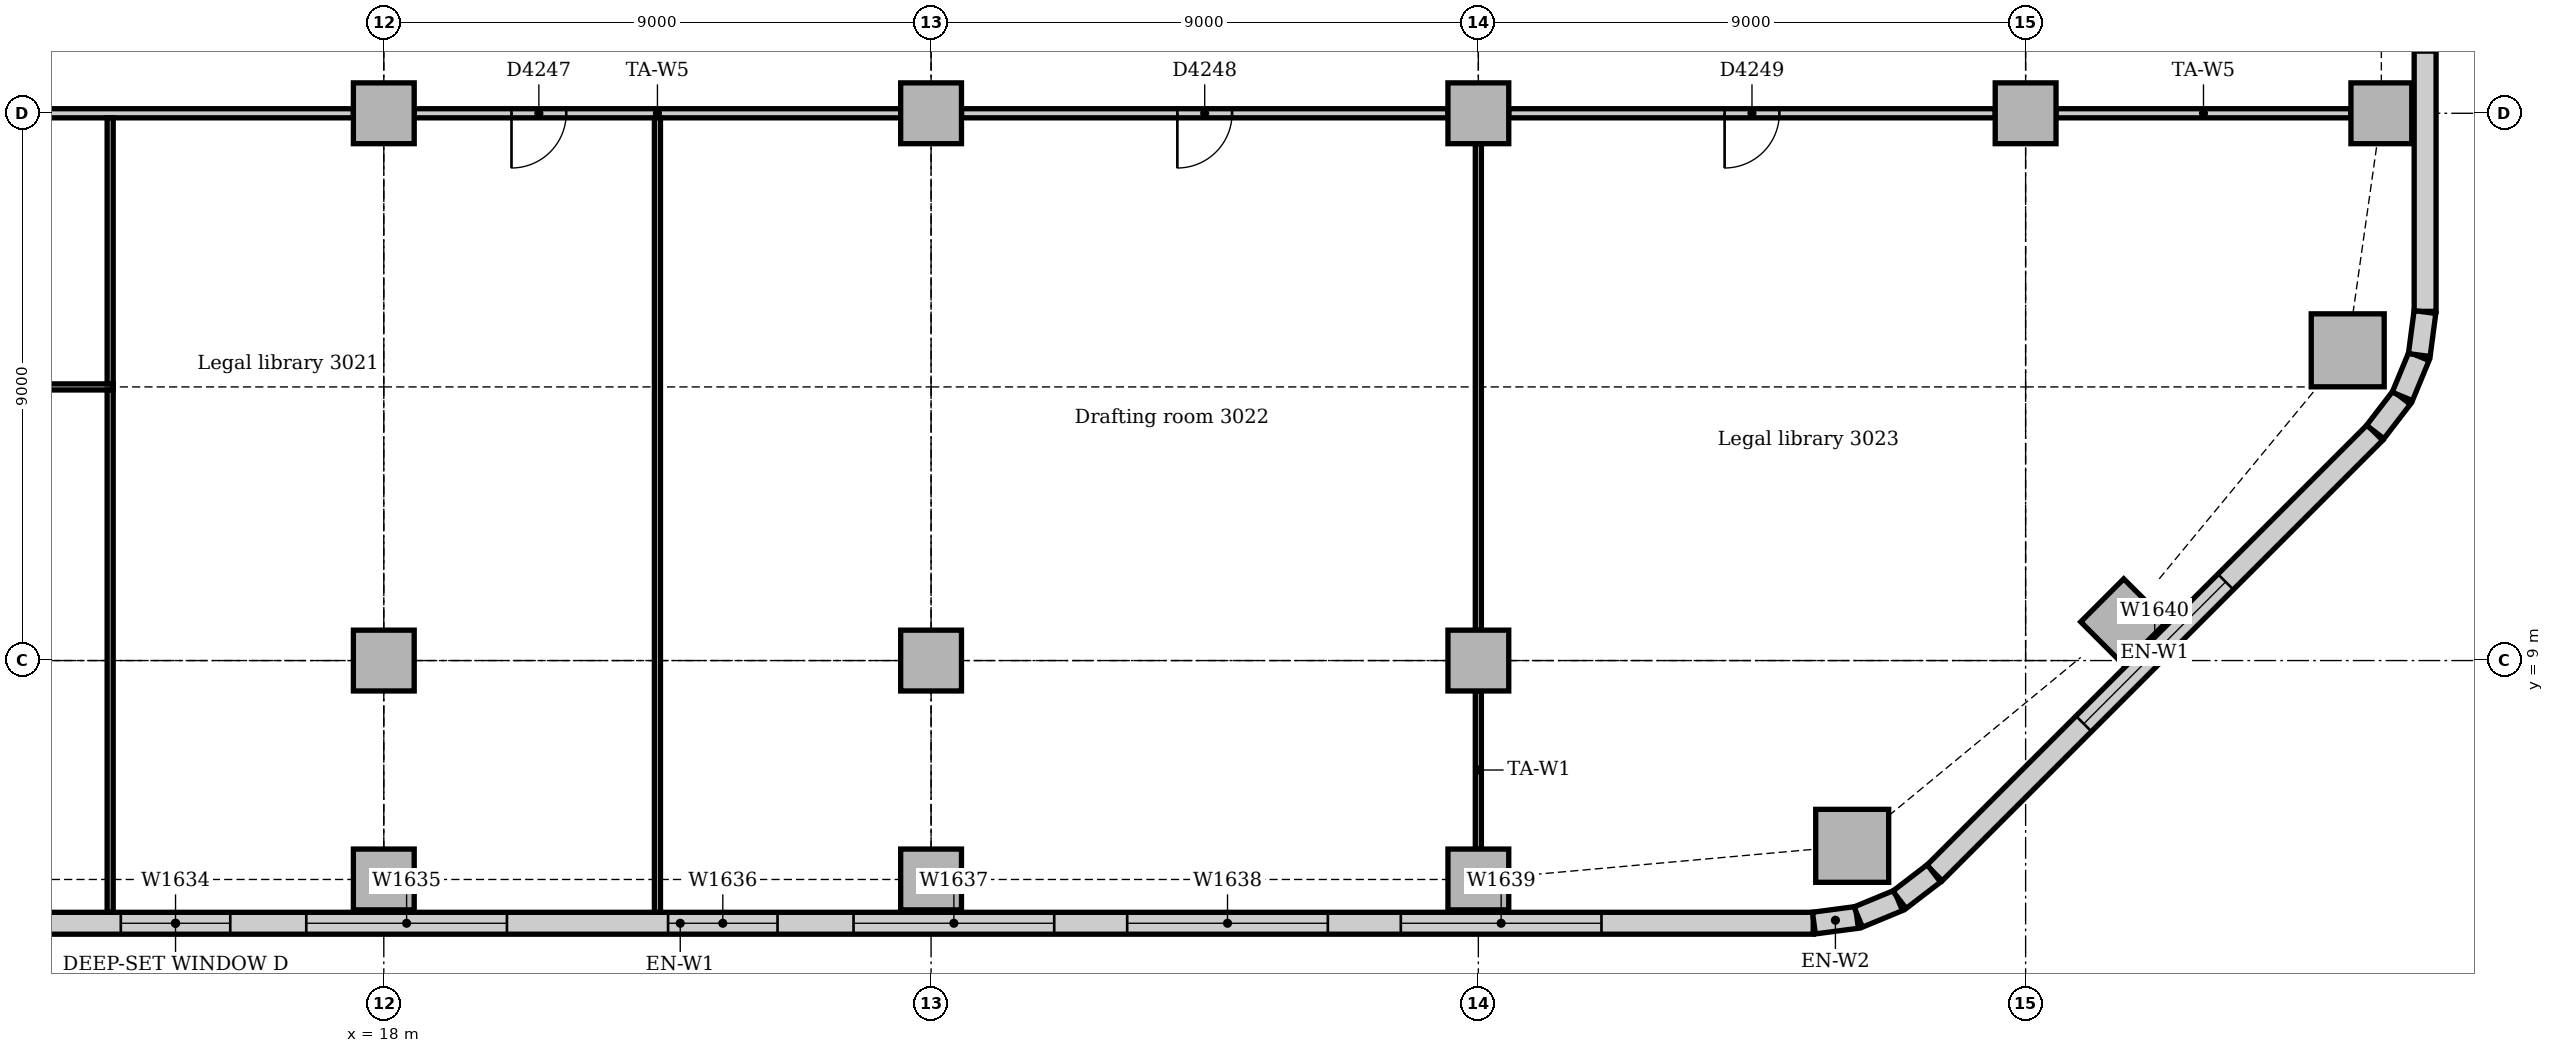
"""IFC4 building model, lengths in metres.
Left out: names, types, materials, properties, quantities, classifications, styles, units other than length and angle.
Written with IfcOpenShell. Run it as: python <this file> out.ifc"""

import sys

from ifc_helpers import new_model, si_unit, direction, frame, frame_2d, origin, origin_2d, place, context, subcontext, project, spatial, rectangle, extrude, element, fill, save


model = new_model("IFC4")
c1 = context("Model", 3, precision=1e-05, world=origin(), true_north=direction((0.0, 1.0)))
c2 = subcontext(c1, "Body", "Model", "MODEL_VIEW")
j1 = project(units=[si_unit("LENGTHUNIT", "METRE"), si_unit("PLANEANGLEUNIT", "RADIAN")], contexts=[c1])
p1 = place(None, origin())
s1 = spatial("IfcSite", under=j1, at=p1, CompositionType="ELEMENT")
p2 = place(p1, origin())
s2 = spatial("IfcBuilding", under=s1, at=p2, CompositionType="ELEMENT")
p3 = place(p2, frame((0.0, 0.0, 128.0)))
s3 = spatial("IfcBuildingStorey", under=s2, at=p3, CompositionType="ELEMENT", Elevation=128.0)
for number, where, z_axis, x_axis in (
    (1, (42.148, 5.953, 0.0), (0.0, 0.0, 1.0), (1.0, 0.0, 0.0)),
    (2, (50.297, 14.102, 0.0), (0.0, 0.0, 1.0), (1.0, 0.0, 0.0)),
):
    element("IfcColumn", number, at=place(p3, frame(where, z_axis=z_axis, x_axis=x_axis)), inside=s3, PredefinedType="COLUMN", context=c2, shape_type="SweptSolid", body=[
        extrude(rectangle(XDim=1.2, YDim=1.2, at=origin_2d()), origin(), (0.0, 0.0, 1.0), 3.85),
    ])
for number, where, z_axis, x_axis in (
    (3, (18.0, 5.4, 0.0), (0.0, 0.0, 1.0), (1.0, 0.0, 0.0)),
    (4, (27.0, 5.4, 0.0), (0.0, 0.0, 1.0), (1.0, 0.0, 0.0)),
    (5, (36.0, 5.4, 0.0), (0.0, 0.0, 1.0), (1.0, 0.0, 0.0)),
    (6, (46.614, 9.636, 0.0), (0.0, 0.0, 1.0), (0.707, 0.707, 0.0)),
    (7, (50.85, 18.0, 0.0), (0.0, 0.0, 1.0), (1.0, 0.0, 0.0)),
    (8, (18.0, 9.0, 0.0), (0.0, 0.0, 1.0), (1.0, 0.0, 0.0)),
    (9, (18.0, 18.0, 0.0), (0.0, 0.0, 1.0), (1.0, 0.0, 0.0)),
    (10, (27.0, 9.0, 0.0), (0.0, 0.0, 1.0), (1.0, 0.0, 0.0)),
    (11, (27.0, 18.0, 0.0), (0.0, 0.0, 1.0), (1.0, 0.0, 0.0)),
    (12, (36.0, 9.0, 0.0), (0.0, 0.0, 1.0), (1.0, 0.0, 0.0)),
    (13, (36.0, 18.0, 0.0), (0.0, 0.0, 1.0), (1.0, 0.0, 0.0)),
    (14, (45.0, 18.0, 0.0), (0.0, 0.0, 1.0), (1.0, 0.0, 0.0)),
):
    element("IfcColumn", number, at=place(p3, frame(where, z_axis=z_axis, x_axis=x_axis)), inside=s3, PredefinedType="COLUMN", context=c2, shape_type="SweptSolid", body=[
        extrude(rectangle(XDim=1.0, YDim=1.0, at=origin_2d()), origin(), (0.0, 0.0, 1.0), 3.85),
    ])
p4 = place(p3, frame((4.243, 4.68, 0.0), z_axis=(0.0, 0.0, 1.0), x_axis=(1.0, 0.0, 0.0)))
e15 = element("IfcWall", 15, at=p4, inside=s3, PredefinedType="STANDARD", context=c2, shape_type="SweptSolid", body=[
    extrude(rectangle(XDim=37.265, YDim=0.36, at=frame_2d((18.632, 0.0))), origin(), (0.0, 0.0, 1.0), 3.85),
])
p5 = place(p4, frame((3.482, 0.0, 0.9)))
e16 = element("IfcOpeningElement", 16, at=p5, cuts=e15, PredefinedType="OPENING", context=c2, shape_type="SweptSolid", body=[
    extrude(rectangle(XDim=3.3, YDim=1.6, at=frame_2d((1.65, 0.8))), frame((0.0, 0.19, 0.0), z_axis=(0.0, -1.0, 0.0), x_axis=(1.0, 0.0, 0.0)), (0.0, 0.0, 1.0), 0.38),
])
p6 = place(p4, frame((9.432, 0.0, 0.9)))
e17 = element("IfcOpeningElement", 17, at=p6, cuts=e15, PredefinedType="OPENING", context=c2, shape_type="SweptSolid", body=[
    extrude(rectangle(XDim=1.8, YDim=1.6, at=frame_2d((0.9, 0.8))), frame((0.0, 0.19, 0.0), z_axis=(0.0, -1.0, 0.0), x_axis=(1.0, 0.0, 0.0)), (0.0, 0.0, 1.0), 0.38),
])
p7 = place(p4, frame((12.482, 0.0, 0.9)))
e18 = element("IfcOpeningElement", 18, at=p7, cuts=e15, PredefinedType="OPENING", context=c2, shape_type="SweptSolid", body=[
    extrude(rectangle(XDim=3.3, YDim=1.6, at=frame_2d((1.65, 0.8))), frame((0.0, 0.19, 0.0), z_axis=(0.0, -1.0, 0.0), x_axis=(1.0, 0.0, 0.0)), (0.0, 0.0, 1.0), 0.38),
])
p8 = place(p4, frame((18.432, 0.0, 0.9)))
e19 = element("IfcOpeningElement", 19, at=p8, cuts=e15, PredefinedType="OPENING", context=c2, shape_type="SweptSolid", body=[
    extrude(rectangle(XDim=1.8, YDim=1.6, at=frame_2d((0.9, 0.8))), frame((0.0, 0.19, 0.0), z_axis=(0.0, -1.0, 0.0), x_axis=(1.0, 0.0, 0.0)), (0.0, 0.0, 1.0), 0.38),
])
p9 = place(p4, frame((21.482, 0.0, 0.9)))
e20 = element("IfcOpeningElement", 20, at=p9, cuts=e15, PredefinedType="OPENING", context=c2, shape_type="SweptSolid", body=[
    extrude(rectangle(XDim=3.3, YDim=1.6, at=frame_2d((1.65, 0.8))), frame((0.0, 0.19, 0.0), z_axis=(0.0, -1.0, 0.0), x_axis=(1.0, 0.0, 0.0)), (0.0, 0.0, 1.0), 0.38),
])
p10 = place(p4, frame((25.982, 0.0, 0.9)))
e21 = element("IfcOpeningElement", 21, at=p10, cuts=e15, PredefinedType="OPENING", context=c2, shape_type="SweptSolid", body=[
    extrude(rectangle(XDim=3.3, YDim=1.6, at=frame_2d((1.65, 0.8))), frame((0.0, 0.19, 0.0), z_axis=(0.0, -1.0, 0.0), x_axis=(1.0, 0.0, 0.0)), (0.0, 0.0, 1.0), 0.38),
])
p11 = place(p4, frame((30.482, 0.0, 0.9)))
e22 = element("IfcOpeningElement", 22, at=p11, cuts=e15, PredefinedType="OPENING", context=c2, shape_type="SweptSolid", body=[
    extrude(rectangle(XDim=3.3, YDim=1.6, at=frame_2d((1.65, 0.8))), frame((0.0, 0.19, 0.0), z_axis=(0.0, -1.0, 0.0), x_axis=(1.0, 0.0, 0.0)), (0.0, 0.0, 1.0), 0.38),
])
p12 = place(p3, frame((43.501, 5.506, 0.0), z_axis=(0.0, 0.0, 1.0), x_axis=(0.707106781187, 0.707106781187, 0.0)))
e23 = element("IfcWall", 23, at=p12, inside=s3, PredefinedType="STANDARD", context=c2, shape_type="SweptSolid", body=[
    extrude(rectangle(XDim=10.243, YDim=0.36, at=frame_2d((5.121, 0.0))), origin(), (0.0, 0.0, 1.0), 3.85),
])
p13 = place(p12, frame((3.471, 0.0, 0.9)))
e24 = element("IfcOpeningElement", 24, at=p13, cuts=e23, PredefinedType="OPENING", context=c2, shape_type="SweptSolid", body=[
    extrude(rectangle(XDim=3.3, YDim=1.6, at=frame_2d((1.65, 0.8))), frame((0.0, 0.19, 0.0), z_axis=(0.0, -1.0, 0.0), x_axis=(1.0, 0.0, 0.0)), (0.0, 0.0, 1.0), 0.38),
])
p14 = place(p3, frame((51.57, 14.743, 0.0), z_axis=(0.0, 0.0, 1.0), x_axis=(0.0, 1.0, 0.0)))
e25 = element("IfcWall", 25, at=p14, inside=s3, PredefinedType="STANDARD", context=c2, shape_type="SweptSolid", body=[
    extrude(rectangle(XDim=24.515, YDim=0.36, at=frame_2d((12.257, 0.0))), origin(), (0.0, 0.0, 1.0), 3.85),
])
p15 = place(p14, frame((4.257, 0.0, 0.9)))
e26 = element("IfcOpeningElement", 26, at=p15, cuts=e25, PredefinedType="OPENING", context=c2, shape_type="SweptSolid", body=[
    extrude(rectangle(XDim=1.8, YDim=1.6, at=frame_2d((0.9, 0.8))), frame((0.0, 0.19, 0.0), z_axis=(0.0, -1.0, 0.0), x_axis=(1.0, 0.0, 0.0)), (0.0, 0.0, 1.0), 0.38),
])
p16 = place(p14, frame((8.357, 0.0, 0.9)))
e27 = element("IfcOpeningElement", 27, at=p16, cuts=e25, PredefinedType="OPENING", context=c2, shape_type="SweptSolid", body=[
    extrude(rectangle(XDim=3.3, YDim=1.6, at=frame_2d((1.65, 0.8))), frame((0.0, 0.19, 0.0), z_axis=(0.0, -1.0, 0.0), x_axis=(1.0, 0.0, 0.0)), (0.0, 0.0, 1.0), 0.38),
])
p17 = place(p14, frame((12.857, 0.0, 0.9)))
e28 = element("IfcOpeningElement", 28, at=p17, cuts=e25, PredefinedType="OPENING", context=c2, shape_type="SweptSolid", body=[
    extrude(rectangle(XDim=3.3, YDim=1.6, at=frame_2d((1.65, 0.8))), frame((0.0, 0.19, 0.0), z_axis=(0.0, -1.0, 0.0), x_axis=(1.0, 0.0, 0.0)), (0.0, 0.0, 1.0), 0.38),
])
p18 = place(p14, frame((17.357, 0.0, 0.9)))
e29 = element("IfcOpeningElement", 29, at=p18, cuts=e25, PredefinedType="OPENING", context=c2, shape_type="SweptSolid", body=[
    extrude(rectangle(XDim=3.3, YDim=1.6, at=frame_2d((1.65, 0.8))), frame((0.0, 0.19, 0.0), z_axis=(0.0, -1.0, 0.0), x_axis=(1.0, 0.0, 0.0)), (0.0, 0.0, 1.0), 0.38),
])
for number, where, z_axis, x_axis in (
    (30, (41.519, 4.683, 0.0), (0.0, 0.0, 1.0), (0.991, 0.131, 0.0)),
    (31, (42.247, 4.782, 0.0), (0.0, 0.0, 1.0), (0.924, 0.383, 0.0)),
):
    element("IfcWall", number, at=place(p3, frame(where, z_axis=z_axis, x_axis=x_axis)), inside=s3, PredefinedType="STANDARD", context=c2, shape_type="SweptSolid", body=[
        extrude(rectangle(XDim=0.713, YDim=0.36, at=frame_2d((0.356, 0.0))), origin(), (0.0, 0.0, 1.0), 3.85),
    ])
for number, where, z_axis, x_axis in (
    (32, (42.925, 5.066, 0.0), (0.0, 0.0, 1.0), (0.793, 0.609, 0.0)),
    (33, (50.75, 12.759, 0.0), (0.0, 0.0, 1.0), (0.609, 0.793, 0.0)),
):
    element("IfcWall", number, at=place(p3, frame(where, z_axis=z_axis, x_axis=x_axis)), inside=s3, PredefinedType="STANDARD", context=c2, shape_type="SweptSolid", body=[
        extrude(rectangle(XDim=0.713, YDim=0.36, at=frame_2d((0.357, 0.0))), origin(), (0.0, 0.0, 1.0), 3.85),
    ])
for number, where, z_axis, x_axis in (
    (34, (51.195, 13.344, 0.0), (0.0, 0.0, 1.0), (0.383, 0.924, 0.0)),
    (35, (51.474, 14.024, 0.0), (0.0, 0.0, 1.0), (0.131, 0.991, 0.0)),
):
    element("IfcWall", number, at=place(p3, frame(where, z_axis=z_axis, x_axis=x_axis)), inside=s3, PredefinedType="STANDARD", context=c2, shape_type="SweptSolid", body=[
        extrude(rectangle(XDim=0.713, YDim=0.36, at=frame_2d((0.356, 0.0))), origin(), (0.0, 0.0, 1.0), 3.85),
    ])
p19 = place(p3, frame((45.5, 18.0, 0.0), z_axis=(0.0, 0.0, 1.0), x_axis=(1.0, 0.0, 0.0)))
e36 = element("IfcWall", 36, at=p19, inside=s3, PredefinedType="PARTITIONING", context=c2, shape_type="SweptSolid", body=[
    extrude(rectangle(XDim=4.85, YDim=0.15, at=frame_2d((2.425, 0.0))), origin(), (0.0, 0.0, 1.0), 3.254),
])
p20 = place(p3, frame((36.5, 18.0, 0.0), z_axis=(0.0, 0.0, 1.0), x_axis=(1.0, 0.0, 0.0)))
e37 = element("IfcWall", 37, at=p20, inside=s3, PredefinedType="PARTITIONING", context=c2, shape_type="SweptSolid", body=[
    extrude(rectangle(XDim=8.0, YDim=0.15, at=frame_2d((4.0, 0.0))), origin(), (0.0, 0.0, 1.0), 3.158),
])
p21 = place(p20, frame((3.55, 0.0, 0.0)))
e38 = element("IfcOpeningElement", 38, at=p21, cuts=e37, PredefinedType="OPENING", context=c2, shape_type="SweptSolid", body=[
    extrude(rectangle(XDim=0.9, YDim=2.1, at=frame_2d((0.45, 1.05))), frame((0.0, 0.085, 0.0), z_axis=(0.0, -1.0, 0.0), x_axis=(1.0, 0.0, 0.0)), (0.0, 0.0, 1.0), 0.17),
])
p22 = place(p3, frame((27.5, 18.0, 0.0), z_axis=(0.0, 0.0, 1.0), x_axis=(1.0, 0.0, 0.0)))
e39 = element("IfcWall", 39, at=p22, inside=s3, PredefinedType="PARTITIONING", context=c2, shape_type="SweptSolid", body=[
    extrude(rectangle(XDim=8.0, YDim=0.15, at=frame_2d((4.0, 0.0))), origin(), (0.0, 0.0, 1.0), 3.158),
])
p23 = place(p22, frame((3.55, 0.0, 0.0)))
e40 = element("IfcOpeningElement", 40, at=p23, cuts=e39, PredefinedType="OPENING", context=c2, shape_type="SweptSolid", body=[
    extrude(rectangle(XDim=0.9, YDim=2.1, at=frame_2d((0.45, 1.05))), frame((0.0, 0.085, 0.0), z_axis=(0.0, -1.0, 0.0), x_axis=(1.0, 0.0, 0.0)), (0.0, 0.0, 1.0), 0.17),
])
p24 = place(p3, frame((18.5, 18.0, 0.0), z_axis=(0.0, 0.0, 1.0), x_axis=(1.0, 0.0, 0.0)))
e41 = element("IfcWall", 41, at=p24, inside=s3, PredefinedType="PARTITIONING", context=c2, shape_type="SweptSolid", body=[
    extrude(rectangle(XDim=8.0, YDim=0.15, at=frame_2d((4.0, 0.0))), origin(), (0.0, 0.0, 1.0), 3.158),
])
p25 = place(p24, frame((1.6, 0.0, 0.0)))
e42 = element("IfcOpeningElement", 42, at=p25, cuts=e41, PredefinedType="OPENING", context=c2, shape_type="SweptSolid", body=[
    extrude(rectangle(XDim=0.9, YDim=2.1, at=frame_2d((0.45, 1.05))), frame((0.0, 0.085, 0.0), z_axis=(0.0, -1.0, 0.0), x_axis=(1.0, 0.0, 0.0)), (0.0, 0.0, 1.0), 0.17),
])
p26 = place(p3, frame((9.5, 18.0, 0.0), z_axis=(0.0, 0.0, 1.0), x_axis=(1.0, 0.0, 0.0)))
e43 = element("IfcWall", 43, at=p26, inside=s3, PredefinedType="PARTITIONING", context=c2, shape_type="SweptSolid", body=[
    extrude(rectangle(XDim=8.0, YDim=0.15, at=frame_2d((4.0, 0.0))), origin(), (0.0, 0.0, 1.0), 3.158),
])
p27 = place(p3, frame((0.36, 13.5, 0.0), z_axis=(0.0, 0.0, 1.0), x_axis=(1.0, 0.0, 0.0)))
e44 = element("IfcWall", 44, at=p27, inside=s3, PredefinedType="PARTITIONING", context=c2, shape_type="SweptSolid", body=[
    extrude(rectangle(XDim=13.19, YDim=0.1, at=frame_2d((6.595, 0.0))), origin(), (0.0, 0.0, 1.0), 3.354),
])
p28 = place(p27, frame((2.8, 0.0, 0.0)))
e45 = element("IfcOpeningElement", 45, at=p28, cuts=e44, PredefinedType="OPENING", context=c2, shape_type="SweptSolid", body=[
    extrude(rectangle(XDim=0.9, YDim=2.1, at=frame_2d((0.45, 1.05))), frame((0.0, 0.06, 0.0), z_axis=(0.0, -1.0, 0.0), x_axis=(1.0, 0.0, 0.0)), (0.0, 0.0, 1.0), 0.12),
])
p29 = place(p27, frame((9.24, 0.0, 0.0)))
e46 = element("IfcOpeningElement", 46, at=p29, cuts=e44, PredefinedType="OPENING", context=c2, shape_type="SweptSolid", body=[
    extrude(rectangle(XDim=0.9, YDim=2.1, at=frame_2d((0.45, 1.05))), frame((0.0, 0.06, 0.0), z_axis=(0.0, -1.0, 0.0), x_axis=(1.0, 0.0, 0.0)), (0.0, 0.0, 1.0), 0.12),
])
p30 = place(p3, frame((13.5, 13.55, 0.0), z_axis=(0.0, 0.0, 1.0), x_axis=(0.0, 1.0, 0.0)))
e47 = element("IfcWall", 47, at=p30, inside=s3, PredefinedType="PARTITIONING", context=c2, shape_type="SweptSolid", body=[
    extrude(rectangle(XDim=4.375, YDim=0.1, at=frame_2d((2.188, 0.0))), origin(), (0.0, 0.0, 1.0), 3.85),
])
p31 = place(p3, frame((13.5, 4.86, 0.0), z_axis=(0.0, 0.0, 1.0), x_axis=(0.0, 1.0, 0.0)))
e48 = element("IfcWall", 48, at=p31, inside=s3, PredefinedType="PARTITIONING", context=c2, shape_type="SweptSolid", body=[
    extrude(rectangle(XDim=8.59, YDim=0.1, at=frame_2d((4.295, 0.0))), origin(), (0.0, 0.0, 1.0), 3.85),
])
p32 = place(p3, frame((22.5, 4.86, 0.0), z_axis=(0.0, 0.0, 1.0), x_axis=(0.0, 1.0, 0.0)))
e49 = element("IfcWall", 49, at=p32, inside=s3, PredefinedType="PARTITIONING", context=c2, shape_type="SweptSolid", body=[
    extrude(rectangle(XDim=13.065, YDim=0.1, at=frame_2d((6.532, 0.0))), origin(), (0.0, 0.0, 1.0), 3.85),
])
p33 = place(p3, frame((36.0, 5.9, 0.0), z_axis=(0.0, 0.0, 1.0), x_axis=(0.0, 1.0, 0.0)))
e50 = element("IfcWall", 50, at=p33, inside=s3, PredefinedType="PARTITIONING", context=c2, shape_type="SweptSolid", body=[
    extrude(rectangle(XDim=2.6, YDim=0.1, at=frame_2d((1.3, 0.0))), origin(), (0.0, 0.0, 1.0), 3.652),
])
p34 = place(p3, frame((36.0, 9.5, 0.0), z_axis=(0.0, 0.0, 1.0), x_axis=(0.0, 1.0, 0.0)))
e51 = element("IfcWall", 51, at=p34, inside=s3, PredefinedType="PARTITIONING", context=c2, shape_type="SweptSolid", body=[
    extrude(rectangle(XDim=8.0, YDim=0.1, at=frame_2d((4.0, 0.0))), origin(), (0.0, 0.0, 1.0), 3.256),
])
p35 = place(p6, origin())
e52 = element("IfcWindow", 52, at=p35, inside=s3, PartitioningType="SINGLE_PANEL", PredefinedType="WINDOW", context=c2, shape_type="SweptSolid", body=[
    extrude(rectangle(XDim=1.8, YDim=1.6, at=frame_2d((0.9, 0.8))), frame((0.0, 0.13, 0.0), z_axis=(0.0, -1.0, 0.0), x_axis=(1.0, 0.0, 0.0)), (0.0, 0.0, 1.0), 0.06),
])
fill(e17, e52)
p36 = place(p7, origin())
e53 = element("IfcWindow", 53, at=p36, inside=s3, PartitioningType="SINGLE_PANEL", PredefinedType="WINDOW", context=c2, shape_type="SweptSolid", body=[
    extrude(rectangle(XDim=3.3, YDim=1.6, at=frame_2d((1.65, 0.8))), frame((0.0, 0.13, 0.0), z_axis=(0.0, -1.0, 0.0), x_axis=(1.0, 0.0, 0.0)), (0.0, 0.0, 1.0), 0.06),
])
fill(e18, e53)
p37 = place(p8, origin())
e54 = element("IfcWindow", 54, at=p37, inside=s3, PartitioningType="SINGLE_PANEL", PredefinedType="WINDOW", context=c2, shape_type="SweptSolid", body=[
    extrude(rectangle(XDim=1.8, YDim=1.6, at=frame_2d((0.9, 0.8))), frame((0.0, 0.13, 0.0), z_axis=(0.0, -1.0, 0.0), x_axis=(1.0, 0.0, 0.0)), (0.0, 0.0, 1.0), 0.06),
])
fill(e19, e54)
p38 = place(p9, origin())
e55 = element("IfcWindow", 55, at=p38, inside=s3, PartitioningType="SINGLE_PANEL", PredefinedType="WINDOW", context=c2, shape_type="SweptSolid", body=[
    extrude(rectangle(XDim=3.3, YDim=1.6, at=frame_2d((1.65, 0.8))), frame((0.0, 0.13, 0.0), z_axis=(0.0, -1.0, 0.0), x_axis=(1.0, 0.0, 0.0)), (0.0, 0.0, 1.0), 0.06),
])
fill(e20, e55)
p39 = place(p10, origin())
e56 = element("IfcWindow", 56, at=p39, inside=s3, PartitioningType="SINGLE_PANEL", PredefinedType="WINDOW", context=c2, shape_type="SweptSolid", body=[
    extrude(rectangle(XDim=3.3, YDim=1.6, at=frame_2d((1.65, 0.8))), frame((0.0, 0.13, 0.0), z_axis=(0.0, -1.0, 0.0), x_axis=(1.0, 0.0, 0.0)), (0.0, 0.0, 1.0), 0.06),
])
fill(e21, e56)
p40 = place(p11, origin())
e57 = element("IfcWindow", 57, at=p40, inside=s3, PartitioningType="SINGLE_PANEL", PredefinedType="WINDOW", context=c2, shape_type="SweptSolid", body=[
    extrude(rectangle(XDim=3.3, YDim=1.6, at=frame_2d((1.65, 0.8))), frame((0.0, 0.13, 0.0), z_axis=(0.0, -1.0, 0.0), x_axis=(1.0, 0.0, 0.0)), (0.0, 0.0, 1.0), 0.06),
])
fill(e22, e57)
p41 = place(p13, origin())
e58 = element("IfcWindow", 58, at=p41, inside=s3, PartitioningType="SINGLE_PANEL", PredefinedType="WINDOW", context=c2, shape_type="SweptSolid", body=[
    extrude(rectangle(XDim=3.3, YDim=1.6, at=frame_2d((1.65, 0.8))), frame((0.0, 0.13, 0.0), z_axis=(0.0, -1.0, 0.0), x_axis=(1.0, 0.0, 0.0)), (0.0, 0.0, 1.0), 0.06),
])
fill(e24, e58)
p42 = place(p25, frame((0.9, 0.0, 0.0), z_axis=(0.0, 0.0, 1.0), x_axis=(-1.0, 0.0, 0.0)))
e59 = element("IfcDoor", 59, at=p42, inside=s3, OperationType="SINGLE_SWING_RIGHT", PredefinedType="DOOR", context=c2, shape_type="SweptSolid", body=[
    extrude(rectangle(XDim=0.9, YDim=2.1, at=frame_2d((0.45, 1.05))), frame((0.0, 0.025, 0.0), z_axis=(0.0, -1.0, 0.0), x_axis=(1.0, 0.0, 0.0)), (0.0, 0.0, 1.0), 0.05),
])
fill(e42, e59)
p43 = place(p23, frame((0.9, 0.0, 0.0), z_axis=(0.0, 0.0, 1.0), x_axis=(-1.0, 0.0, 0.0)))
e60 = element("IfcDoor", 60, at=p43, inside=s3, OperationType="SINGLE_SWING_RIGHT", PredefinedType="DOOR", context=c2, shape_type="SweptSolid", body=[
    extrude(rectangle(XDim=0.9, YDim=2.1, at=frame_2d((0.45, 1.05))), frame((0.0, 0.025, 0.0), z_axis=(0.0, -1.0, 0.0), x_axis=(1.0, 0.0, 0.0)), (0.0, 0.0, 1.0), 0.05),
])
fill(e40, e60)
p44 = place(p21, frame((0.9, 0.0, 0.0), z_axis=(0.0, 0.0, 1.0), x_axis=(-1.0, 0.0, 0.0)))
e61 = element("IfcDoor", 61, at=p44, inside=s3, OperationType="SINGLE_SWING_RIGHT", PredefinedType="DOOR", context=c2, shape_type="SweptSolid", body=[
    extrude(rectangle(XDim=0.9, YDim=2.1, at=frame_2d((0.45, 1.05))), frame((0.0, 0.025, 0.0), z_axis=(0.0, -1.0, 0.0), x_axis=(1.0, 0.0, 0.0)), (0.0, 0.0, 1.0), 0.05),
])
fill(e38, e61)
save(model, sys.argv[1])
